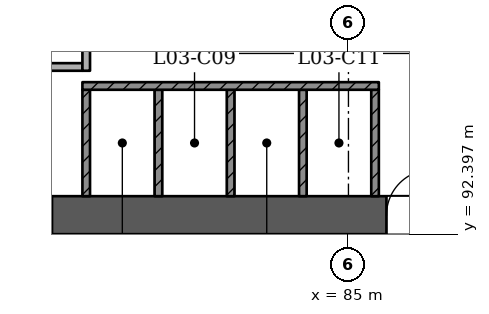
"""IFC4 building model, lengths in metres.
Left out: names, types, materials, properties, quantities, classifications, styles, units other than length and angle.
Written with IfcOpenShell. Run it as: python <this file> out.ifc"""

import sys

from ifc_helpers import new_model, si_unit, direction, frame, frame_2d, origin, place, context, subcontext, project, spatial, rectangle, extrude, element, fill, save


model = new_model("IFC4")
c1 = context("Model", 3, precision=1e-05, world=origin(), true_north=direction((0.0, 1.0)))
c2 = subcontext(c1, "Body", "Model", "MODEL_VIEW")
j1 = project(units=[si_unit("LENGTHUNIT", "METRE"), si_unit("PLANEANGLEUNIT", "RADIAN")], contexts=[c1])
p1 = place(None, origin())
s1 = spatial("IfcSite", under=j1, at=p1, CompositionType="ELEMENT")
p2 = place(p1, origin())
s2 = spatial("IfcBuilding", under=s1, at=p2, CompositionType="ELEMENT")
p3 = place(p2, frame((0.0, 0.0, 18.0)))
s3 = spatial("IfcBuildingStorey", under=s2, at=p3, CompositionType="ELEMENT", Elevation=18.0)
p4 = place(p3, frame((72.5, 92.9, 0.0), z_axis=(0.0, 0.0, 1.0), x_axis=(1.0, 0.0, 0.0)))
e1 = element("IfcWall", 1, at=p4, inside=s3, PredefinedType="SHEAR", context=c2, shape_type="SweptSolid", body=[
    extrude(rectangle(XDim=25.5, YDim=1.0, at=frame_2d((12.75, 0.0))), origin(), (0.0, 0.0, 1.0), 4.5),
])
p5 = place(p4, frame((1.3, 0.0, 0.0)))
e2 = element("IfcOpeningElement", 2, at=p5, cuts=e1, PredefinedType="OPENING", context=c2, shape_type="SweptSolid", body=[
    extrude(rectangle(XDim=1.2, YDim=2.1, at=frame_2d((0.6, 1.05))), frame((0.0, 0.51, 0.0), z_axis=(0.0, -1.0, 0.0), x_axis=(1.0, 0.0, 0.0)), (0.0, 0.0, 1.0), 1.021),
])
p6 = place(p4, frame((3.5, 0.0, 0.0)))
e3 = element("IfcOpeningElement", 3, at=p6, cuts=e1, PredefinedType="OPENING", context=c2, shape_type="SweptSolid", body=[
    extrude(rectangle(XDim=1.2, YDim=2.1, at=frame_2d((0.6, 1.05))), frame((0.0, 0.51, 0.0), z_axis=(0.0, -1.0, 0.0), x_axis=(1.0, 0.0, 0.0)), (0.0, 0.0, 1.0), 1.021),
])
p7 = place(p4, frame((13.5, 0.0, 0.0)))
e4 = element("IfcOpeningElement", 4, at=p7, cuts=e1, PredefinedType="OPENING", context=c2, shape_type="SweptSolid", body=[
    extrude(rectangle(XDim=1.2, YDim=2.1, at=frame_2d((0.6, 1.05))), frame((0.0, 0.51, 0.0), z_axis=(0.0, -1.0, 0.0), x_axis=(1.0, 0.0, 0.0)), (0.0, 0.0, 1.0), 1.021),
])
p8 = place(p4, frame((15.562, 0.0, 0.0)))
e5 = element("IfcOpeningElement", 5, at=p8, cuts=e1, PredefinedType="OPENING", context=c2, shape_type="SweptSolid", body=[
    extrude(rectangle(XDim=1.0, YDim=2.1, at=frame_2d((0.5, 1.05))), frame((0.0, 0.51, 0.0), z_axis=(0.0, -1.0, 0.0), x_axis=(1.0, 0.0, 0.0)), (0.0, 0.0, 1.0), 1.021),
])
p9 = place(p4, frame((17.8, 0.0, 0.0)))
e6 = element("IfcOpeningElement", 6, at=p9, cuts=e1, PredefinedType="OPENING", context=c2, shape_type="SweptSolid", body=[
    extrude(rectangle(XDim=1.0, YDim=2.1, at=frame_2d((0.5, 1.05))), frame((0.0, 0.51, 0.0), z_axis=(0.0, -1.0, 0.0), x_axis=(1.0, 0.0, 0.0)), (0.0, 0.0, 1.0), 1.021),
])
p10 = place(p4, frame((20.35, 0.0, 0.0)))
e7 = element("IfcOpeningElement", 7, at=p10, cuts=e1, PredefinedType="OPENING", context=c2, shape_type="SweptSolid", body=[
    extrude(rectangle(XDim=1.0, YDim=2.1, at=frame_2d((0.5, 1.05))), frame((0.0, 0.51, 0.0), z_axis=(0.0, -1.0, 0.0), x_axis=(1.0, 0.0, 0.0)), (0.0, 0.0, 1.0), 1.021),
])
p11 = place(p4, frame((22.837, 0.0, 0.0)))
e8 = element("IfcOpeningElement", 8, at=p11, cuts=e1, PredefinedType="OPENING", context=c2, shape_type="SweptSolid", body=[
    extrude(rectangle(XDim=1.0, YDim=2.1, at=frame_2d((0.5, 1.05))), frame((0.0, 0.51, 0.0), z_axis=(0.0, -1.0, 0.0), x_axis=(1.0, 0.0, 0.0)), (0.0, 0.0, 1.0), 1.021),
])
p12 = place(p3, frame((55.57, 95.474, 0.0), z_axis=(0.0, 0.0, 1.0), x_axis=(0.500000085768, -0.866025354266, 0.0)))
e9 = element("IfcWall", 9, at=p12, inside=s3, PredefinedType="PARTITIONING", context=c2, shape_type="SweptSolid", body=[
    extrude(rectangle(XDim=55.365, YDim=0.15, at=frame_2d((27.682, 0.0))), origin(), (0.0, 0.0, 1.0), 3.55),
])
p13 = place(p12, frame((9.082, 0.0, 0.0)))
e10 = element("IfcOpeningElement", 10, at=p13, cuts=e9, PredefinedType="OPENING", context=c2, shape_type="SweptSolid", body=[
    extrude(rectangle(XDim=1.2, YDim=2.1, at=frame_2d((0.6, 1.05))), frame((0.0, 0.085, 0.0), z_axis=(0.0, -1.0, 0.0), x_axis=(1.0, 0.0, 0.0)), (0.0, 0.0, 1.0), 0.171),
])
p14 = place(p12, frame((18.906, 0.0, 0.0)))
e11 = element("IfcOpeningElement", 11, at=p14, cuts=e9, PredefinedType="OPENING", context=c2, shape_type="SweptSolid", body=[
    extrude(rectangle(XDim=0.9, YDim=2.1, at=frame_2d((0.45, 1.05))), frame((0.0, 0.085, 0.0), z_axis=(0.0, -1.0, 0.0), x_axis=(1.0, 0.0, 0.0)), (0.0, 0.0, 1.0), 0.171),
])
p15 = place(p12, frame((21.856, 0.0, 0.0)))
e12 = element("IfcOpeningElement", 12, at=p15, cuts=e9, PredefinedType="OPENING", context=c2, shape_type="SweptSolid", body=[
    extrude(rectangle(XDim=0.9, YDim=2.1, at=frame_2d((0.45, 1.05))), frame((0.0, 0.085, 0.0), z_axis=(0.0, -1.0, 0.0), x_axis=(1.0, 0.0, 0.0)), (0.0, 0.0, 1.0), 0.171),
])
p16 = place(p12, frame((31.582, 0.0, 0.0)))
e13 = element("IfcOpeningElement", 13, at=p16, cuts=e9, PredefinedType="OPENING", context=c2, shape_type="SweptSolid", body=[
    extrude(rectangle(XDim=1.2, YDim=2.1, at=frame_2d((0.6, 1.05))), frame((0.0, 0.085, 0.0), z_axis=(0.0, -1.0, 0.0), x_axis=(1.0, 0.0, 0.0)), (0.0, 0.0, 1.0), 0.171),
])
p17 = place(p12, frame((45.082, 0.0, 0.0)))
e14 = element("IfcOpeningElement", 14, at=p17, cuts=e9, PredefinedType="OPENING", context=c2, shape_type="SweptSolid", body=[
    extrude(rectangle(XDim=1.2, YDim=2.1, at=frame_2d((0.6, 1.05))), frame((0.0, 0.085, 0.0), z_axis=(0.0, -1.0, 0.0), x_axis=(1.0, 0.0, 0.0)), (0.0, 0.0, 1.0), 0.171),
])
p18 = place(p12, frame((53.195, 0.0, 0.0)))
e15 = element("IfcOpeningElement", 15, at=p18, cuts=e9, PredefinedType="OPENING", context=c2, shape_type="SweptSolid", body=[
    extrude(rectangle(XDim=1.2, YDim=2.1, at=frame_2d((0.6, 1.05))), frame((0.0, 0.085, 0.0), z_axis=(0.0, -1.0, 0.0), x_axis=(1.0, 0.0, 0.0)), (0.0, 0.0, 1.0), 0.171),
])
p19 = place(p3, frame((79.673, 41.126, 0.0), z_axis=(0.0, 0.0, 1.0), x_axis=(-0.499997306052, 0.866026959131, 0.0)))
e16 = element("IfcWall", 16, at=p19, inside=s3, PredefinedType="SOLIDWALL", context=c2, shape_type="SweptSolid", body=[
    extrude(rectangle(XDim=62.87, YDim=0.4, at=frame_2d((31.435, 0.0))), origin(), (0.0, 0.0, 1.0), 3.55),
])
p20 = place(p19, frame((54.986, 0.0, 0.9)))
e17 = element("IfcOpeningElement", 17, at=p20, cuts=e16, PredefinedType="OPENING", context=c2, shape_type="SweptSolid", body=[
    extrude(rectangle(XDim=2.4, YDim=1.5, at=frame_2d((1.2, 0.75))), frame((0.0, 0.21, 0.0), z_axis=(0.0, -1.0, 0.0), x_axis=(1.0, 0.0, 0.0)), (0.0, 0.0, 1.0), 0.421),
])
p21 = place(p19, frame((50.486, 0.0, 0.9)))
e18 = element("IfcOpeningElement", 18, at=p21, cuts=e16, PredefinedType="OPENING", context=c2, shape_type="SweptSolid", body=[
    extrude(rectangle(XDim=2.4, YDim=1.5, at=frame_2d((1.2, 0.75))), frame((0.0, 0.21, 0.0), z_axis=(0.0, -1.0, 0.0), x_axis=(1.0, 0.0, 0.0)), (0.0, 0.0, 1.0), 0.421),
])
p22 = place(p19, frame((45.986, 0.0, 0.9)))
e19 = element("IfcOpeningElement", 19, at=p22, cuts=e16, PredefinedType="OPENING", context=c2, shape_type="SweptSolid", body=[
    extrude(rectangle(XDim=2.4, YDim=1.5, at=frame_2d((1.2, 0.75))), frame((0.0, 0.21, 0.0), z_axis=(0.0, -1.0, 0.0), x_axis=(1.0, 0.0, 0.0)), (0.0, 0.0, 1.0), 0.421),
])
p23 = place(p19, frame((32.486, 0.0, 0.9)))
e20 = element("IfcOpeningElement", 20, at=p23, cuts=e16, PredefinedType="OPENING", context=c2, shape_type="SweptSolid", body=[
    extrude(rectangle(XDim=2.4, YDim=1.5, at=frame_2d((1.2, 0.75))), frame((0.0, 0.21, 0.0), z_axis=(0.0, -1.0, 0.0), x_axis=(1.0, 0.0, 0.0)), (0.0, 0.0, 1.0), 0.421),
])
p24 = place(p19, frame((27.986, 0.0, 0.9)))
e21 = element("IfcOpeningElement", 21, at=p24, cuts=e16, PredefinedType="OPENING", context=c2, shape_type="SweptSolid", body=[
    extrude(rectangle(XDim=2.4, YDim=1.5, at=frame_2d((1.2, 0.75))), frame((0.0, 0.21, 0.0), z_axis=(0.0, -1.0, 0.0), x_axis=(1.0, 0.0, 0.0)), (0.0, 0.0, 1.0), 0.421),
])
p25 = place(p19, frame((23.486, 0.0, 0.9)))
e22 = element("IfcOpeningElement", 22, at=p25, cuts=e16, PredefinedType="OPENING", context=c2, shape_type="SweptSolid", body=[
    extrude(rectangle(XDim=2.4, YDim=1.5, at=frame_2d((1.2, 0.75))), frame((0.0, 0.21, 0.0), z_axis=(0.0, -1.0, 0.0), x_axis=(1.0, 0.0, 0.0)), (0.0, 0.0, 1.0), 0.421),
])
p26 = place(p19, frame((18.986, 0.0, 0.9)))
e23 = element("IfcOpeningElement", 23, at=p26, cuts=e16, PredefinedType="OPENING", context=c2, shape_type="SweptSolid", body=[
    extrude(rectangle(XDim=2.4, YDim=1.5, at=frame_2d((1.2, 0.75))), frame((0.0, 0.21, 0.0), z_axis=(0.0, -1.0, 0.0), x_axis=(1.0, 0.0, 0.0)), (0.0, 0.0, 1.0), 0.421),
])
p27 = place(p19, frame((14.486, 0.0, 0.9)))
e24 = element("IfcOpeningElement", 24, at=p27, cuts=e16, PredefinedType="OPENING", context=c2, shape_type="SweptSolid", body=[
    extrude(rectangle(XDim=2.4, YDim=1.5, at=frame_2d((1.2, 0.75))), frame((0.0, 0.21, 0.0), z_axis=(0.0, -1.0, 0.0), x_axis=(1.0, 0.0, 0.0)), (0.0, 0.0, 1.0), 0.421),
])
for number, where, z_axis, x_axis in (
    (25, (78.1, 93.4, 0.0), (0.0, 0.0, 1.0), (0.0, 1.0, 0.0)),
    (26, (80.0, 93.4, 0.0), (0.0, 0.0, 1.0), (0.0, 1.0, 0.0)),
    (27, (81.9, 93.4, 0.0), (0.0, 0.0, 1.0), (0.0, 1.0, 0.0)),
    (28, (83.8, 93.4, 0.0), (0.0, 0.0, 1.0), (0.0, 1.0, 0.0)),
    (29, (85.7, 93.4, 0.0), (0.0, 0.0, 1.0), (0.0, 1.0, 0.0)),
):
    element("IfcWall", number, at=place(p3, frame(where, z_axis=z_axis, x_axis=x_axis)), inside=s3, PredefinedType="SOLIDWALL", context=c2, shape_type="SweptSolid", body=[
        extrude(rectangle(XDim=2.8, YDim=0.2, at=frame_2d((1.4, 0.0))), origin(), (0.0, 0.0, 1.0), 4.05),
    ])
p28 = place(p3, frame((78.0, 96.3, 0.0), z_axis=(0.0, 0.0, 1.0), x_axis=(1.0, 0.0, 0.0)))
e30 = element("IfcWall", 30, at=p28, inside=s3, PredefinedType="SOLIDWALL", context=c2, shape_type="SweptSolid", body=[
    extrude(rectangle(XDim=7.8, YDim=0.2, at=frame_2d((3.9, 0.0))), origin(), (0.0, 0.0, 1.0), 4.05),
])
p29 = place(p3, frame((76.1, 96.8, 0.0), z_axis=(0.0, 0.0, 1.0), x_axis=(1.0, 0.0, 0.0)))
e31 = element("IfcWall", 31, at=p29, inside=s3, PredefinedType="PARTITIONING", context=c2, shape_type="SweptSolid", body=[
    extrude(rectangle(XDim=1.9, YDim=0.2, at=frame_2d((0.95, 0.0))), origin(), (0.0, 0.0, 1.0), 4.05),
])
p30 = place(p3, frame((78.1, 96.7, 0.0), z_axis=(0.0, 0.0, 1.0), x_axis=(0.0, 1.0, 0.0)))
e32 = element("IfcWall", 32, at=p30, inside=s3, PredefinedType="PARTITIONING", context=c2, shape_type="SweptSolid", body=[
    extrude(rectangle(XDim=3.7, YDim=0.2, at=frame_2d((1.85, 0.0))), origin(), (0.0, 0.0, 1.0), 4.05),
])
p31 = place(p30, frame((1.95, 0.0, 0.0)))
e33 = element("IfcOpeningElement", 33, at=p31, cuts=e32, PredefinedType="OPENING", context=c2, shape_type="SweptSolid", body=[
    extrude(rectangle(XDim=1.1, YDim=2.1, at=frame_2d((0.55, 1.05))), frame((0.0, 0.11, 0.0), z_axis=(0.0, -1.0, 0.0), x_axis=(1.0, 0.0, 0.0)), (0.0, 0.0, 1.0), 0.221),
])
p32 = place(p6, origin())
e34 = element("IfcDoor", 34, at=p32, inside=s3, OperationType="SINGLE_SWING_LEFT", PredefinedType="NOTDEFINED", context=c2, shape_type="SweptSolid", body=[
    extrude(rectangle(XDim=1.2, YDim=2.1, at=frame_2d((0.6, 1.05))), frame((0.0, 0.025, 0.0), z_axis=(0.0, -1.0, 0.0), x_axis=(1.0, 0.0, 0.0)), (0.0, 0.0, 1.0), 0.05),
])
fill(e3, e34)
p33 = place(p7, origin())
e35 = element("IfcDoor", 35, at=p33, inside=s3, OperationType="SINGLE_SWING_RIGHT", PredefinedType="NOTDEFINED", context=c2, shape_type="SweptSolid", body=[
    extrude(rectangle(XDim=1.2, YDim=2.1, at=frame_2d((0.6, 1.05))), frame((0.0, 0.025, 0.0), z_axis=(0.0, -1.0, 0.0), x_axis=(1.0, 0.0, 0.0)), (0.0, 0.0, 1.0), 0.05),
])
fill(e4, e35)
save(model, sys.argv[1])
